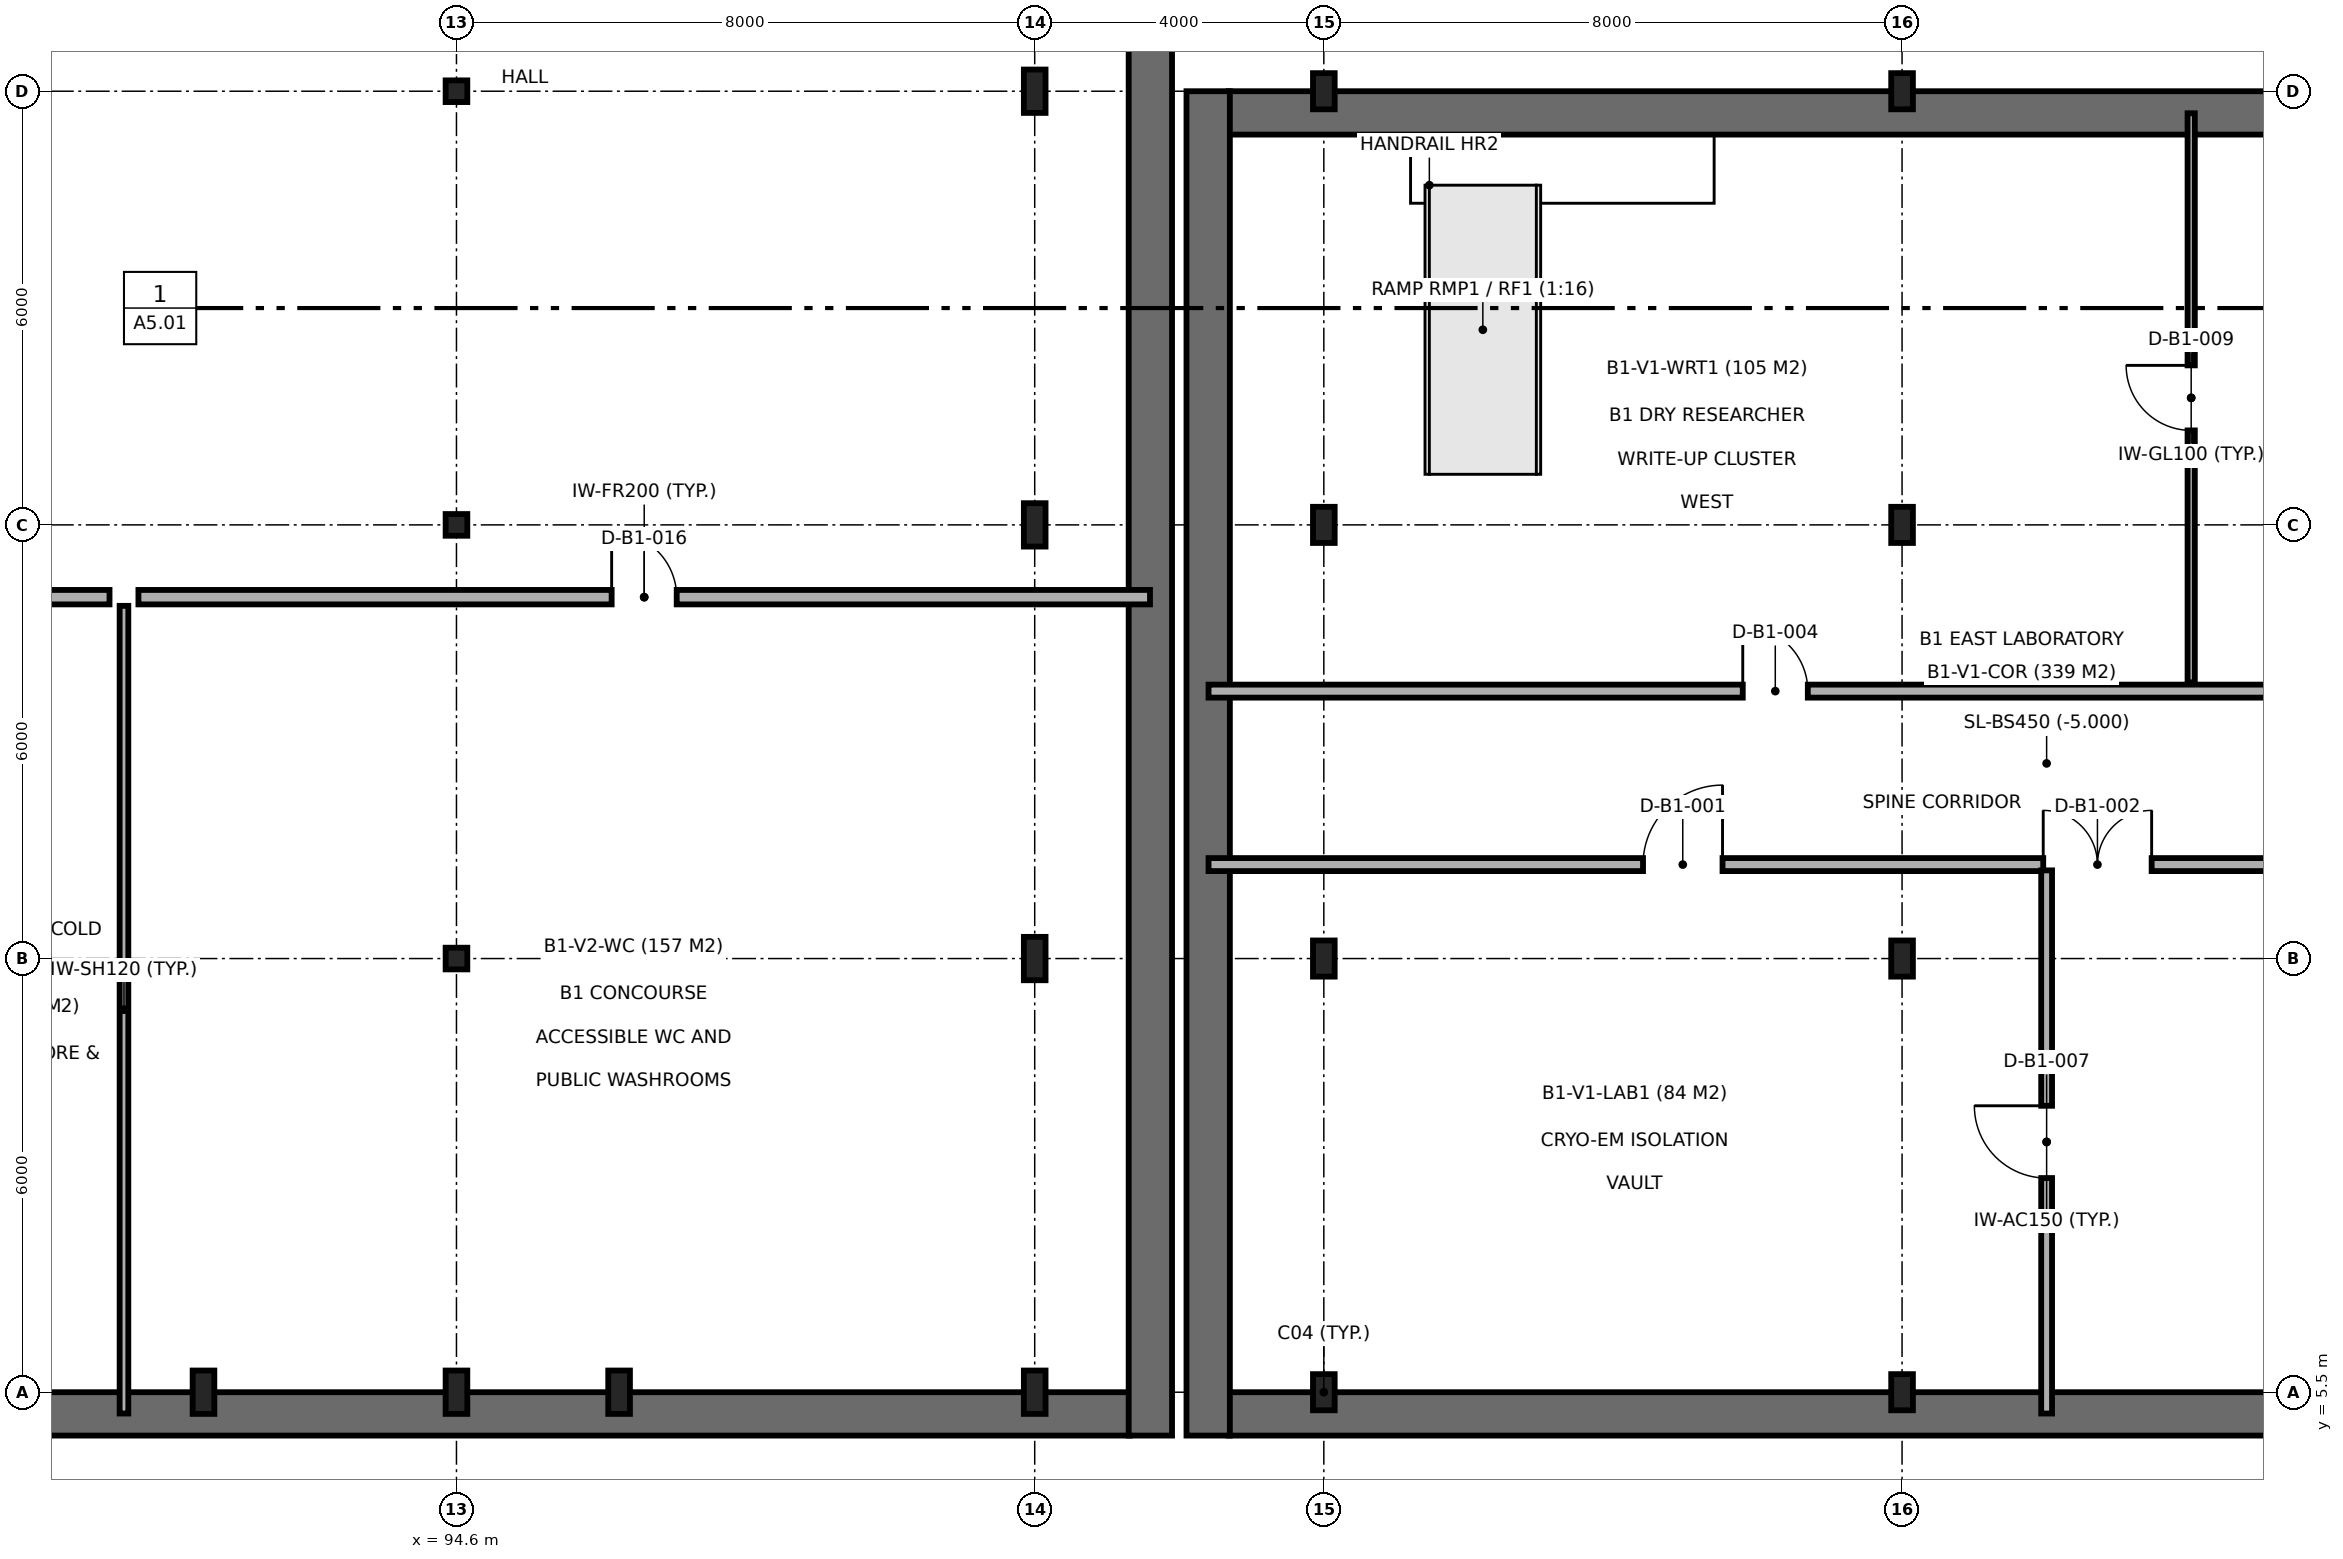
"""IFC4 building model, lengths in metres.
Left out: names, types, materials, properties, quantities, classifications, styles, units other than length and angle.
Written with IfcOpenShell. Run it as: python <this file> out.ifc"""

import sys

from ifc_helpers import new_model, si_unit, direction, frame, frame_2d, origin, origin_2d, place, context, subcontext, project, spatial, rectangle, hollow_rectangle, i_section, extrude, element, fill, save


model = new_model("IFC4")
c1 = context("Model", 3, precision=1e-05, world=origin(), true_north=direction((0.0, 1.0)))
c2 = subcontext(c1, "Body", "Model", "MODEL_VIEW")
j1 = project(units=[si_unit("LENGTHUNIT", "METRE"), si_unit("PLANEANGLEUNIT", "RADIAN")], contexts=[c1])
p1 = place(None, origin())
s1 = spatial("IfcSite", under=j1, at=p1, CompositionType="ELEMENT")
p2 = place(p1, origin())
s2 = spatial("IfcBuilding", under=s1, at=p2, CompositionType="ELEMENT")
p3 = place(p2, frame((0.0, 0.0, -5.0)))
s3 = spatial("IfcBuildingStorey", under=s2, at=p3, CompositionType="ELEMENT", Elevation=-5.0)
for number, where, z_axis, x_axis in (
    (1, (91.1, 5.5, 0.0), (0.0, 0.0, 1.0), (1.0, 0.0, 0.0)),
    (2, (94.6, 5.5, 0.0), (0.0, 0.0, 1.0), (1.0, 0.0, 0.0)),
):
    element("IfcColumn", number, at=place(p3, frame(where, z_axis=z_axis, x_axis=x_axis)), inside=s3, PredefinedType="COLUMN", context=c2, shape_type="SweptSolid", body=[
        extrude(i_section(OverallWidth=0.3, OverallDepth=0.6, WebThickness=0.015, FlangeThickness=0.03, FilletRadius=0.027, at=origin_2d()), origin(), (0.0, 0.0, 1.0), 5.0),
    ])
for number, where, z_axis, x_axis in (
    (3, (94.6, 11.5, 0.0), (0.0, 0.0, 1.0), (1.0, 0.0, 0.0)),
    (4, (94.6, 17.5, 0.0), (0.0, 0.0, 1.0), (1.0, 0.0, 0.0)),
    (5, (94.6, 23.5, 0.0), (0.0, 0.0, 1.0), (1.0, 0.0, 0.0)),
):
    element("IfcColumn", number, at=place(p3, frame(where, z_axis=z_axis, x_axis=x_axis)), inside=s3, PredefinedType="COLUMN", context=c2, shape_type="SweptSolid", body=[
        extrude(hollow_rectangle(XDim=0.3, YDim=0.3, WallThickness=0.012, InnerFilletRadius=0.019, OuterFilletRadius=0.031, at=origin_2d()), origin(), (0.0, 0.0, 1.0), 5.0),
    ])
for number, where, z_axis, x_axis in (
    (6, (96.85, 5.5, 0.0), (0.0, 0.0, 1.0), (1.0, 0.0, 0.0)),
    (7, (102.6, 5.5, 0.0), (0.0, 0.0, 1.0), (1.0, 0.0, 0.0)),
    (8, (102.6, 11.5, 0.0), (0.0, 0.0, 1.0), (1.0, 0.0, 0.0)),
    (9, (102.6, 17.5, 0.0), (0.0, 0.0, 1.0), (1.0, 0.0, 0.0)),
    (10, (102.6, 23.5, 0.0), (0.0, 0.0, 1.0), (1.0, 0.0, 0.0)),
):
    element("IfcColumn", number, at=place(p3, frame(where, z_axis=z_axis, x_axis=x_axis)), inside=s3, PredefinedType="COLUMN", context=c2, shape_type="SweptSolid", body=[
        extrude(i_section(OverallWidth=0.3, OverallDepth=0.6, WebThickness=0.015, FlangeThickness=0.03, FilletRadius=0.027, at=origin_2d()), origin(), (0.0, 0.0, 1.0), 5.0),
    ])
for number, where, z_axis, x_axis in (
    (11, (106.6, 5.5, 0.0), (0.0, 0.0, 1.0), (1.0, 0.0, 0.0)),
    (12, (106.6, 11.5, 0.0), (0.0, 0.0, 1.0), (1.0, 0.0, 0.0)),
    (13, (106.6, 17.5, 0.0), (0.0, 0.0, 1.0), (1.0, 0.0, 0.0)),
    (14, (106.6, 23.5, 0.0), (0.0, 0.0, 1.0), (1.0, 0.0, 0.0)),
    (15, (114.6, 5.5, 0.0), (0.0, 0.0, 1.0), (1.0, 0.0, 0.0)),
    (16, (114.6, 11.5, 0.0), (0.0, 0.0, 1.0), (1.0, 0.0, 0.0)),
    (17, (114.6, 17.5, 0.0), (0.0, 0.0, 1.0), (1.0, 0.0, 0.0)),
    (18, (114.6, 23.5, 0.0), (0.0, 0.0, 1.0), (1.0, 0.0, 0.0)),
):
    element("IfcColumn", number, at=place(p3, frame(where, z_axis=z_axis, x_axis=x_axis)), inside=s3, PredefinedType="COLUMN", context=c2, shape_type="SweptSolid", body=[
        extrude(i_section(OverallWidth=0.3, OverallDepth=0.5, WebThickness=0.014, FlangeThickness=0.028, FilletRadius=0.027, at=origin_2d()), origin(), (0.0, 0.0, 1.0), 5.0),
    ])
p4 = place(p3, frame((105.282, 5.2, 0.0), z_axis=(0.0, 0.0, 1.0), x_axis=(1.0, 0.0, 0.0)))
e19 = element("IfcWall", 19, at=p4, inside=s3, PredefinedType="SHEAR", context=c2, shape_type="SweptSolid", body=[
    extrude(rectangle(XDim=59.118, YDim=0.6, at=frame_2d((29.559, 0.0))), origin(), (0.0, 0.0, 1.0), 4.7),
])
p5 = place(p3, frame((139.182, 23.2, 0.0), z_axis=(0.0, 0.0, 1.0), x_axis=(-1.0, 0.0, 0.0)))
e20 = element("IfcWall", 20, at=p5, inside=s3, PredefinedType="SHEAR", context=c2, shape_type="SweptSolid", body=[
    extrude(rectangle(XDim=33.9, YDim=0.6, at=frame_2d((16.95, 0.0))), origin(), (0.0, 0.0, 1.0), 4.7),
])
p6 = place(p3, frame((105.0, 23.5, 0.0), z_axis=(0.0, 0.0, 1.0), x_axis=(0.0, -1.0, 0.0)))
e21 = element("IfcWall", 21, at=p6, inside=s3, PredefinedType="SHEAR", context=c2, shape_type="SweptSolid", body=[
    extrude(rectangle(XDim=18.6, YDim=0.6, at=frame_2d((9.3, 0.0))), origin(), (0.0, 0.0, 1.0), 4.7),
])
p7 = place(p3, frame((55.282, 5.2, 0.0), z_axis=(0.0, 0.0, 1.0), x_axis=(1.0, 0.0, 0.0)))
e22 = element("IfcWall", 22, at=p7, inside=s3, PredefinedType="SHEAR", context=c2, shape_type="SweptSolid", body=[
    extrude(rectangle(XDim=48.636, YDim=0.6, at=frame_2d((24.318, 0.0))), origin(), (0.0, 0.0, 1.0), 4.7),
])
p8 = place(p3, frame((104.2, 4.9, 0.0), z_axis=(0.0, 0.0, 1.0), x_axis=(0.0, 1.0, 0.0)))
e23 = element("IfcWall", 23, at=p8, inside=s3, PredefinedType="SHEAR", context=c2, shape_type="SweptSolid", body=[
    extrude(rectangle(XDim=36.6, YDim=0.6, at=frame_2d((18.3, 0.0))), origin(), (0.0, 0.0, 1.0), 4.7),
])
p9 = place(p3, frame((105.005, 12.8, 0.0), z_axis=(0.0, 0.0, 1.0), x_axis=(1.0, 0.0, 0.0)))
e24 = element("IfcWall", 24, at=p9, inside=s3, PredefinedType="PARTITIONING", context=c2, shape_type="SweptSolid", body=[
    extrude(rectangle(XDim=34.495, YDim=0.18, at=frame_2d((17.248, 0.0))), origin(), (0.0, 0.0, 1.0), 4.7),
])
p10 = place(p9, frame((6.011, 0.0, 0.0)))
e25 = element("IfcOpeningElement", 25, at=p10, cuts=e24, PredefinedType="OPENING", context=c2, shape_type="SweptSolid", body=[
    extrude(rectangle(XDim=1.1, YDim=2.15, at=frame_2d((0.55, 1.075))), frame((0.0, 0.1, 0.0), z_axis=(0.0, -1.0, 0.0), x_axis=(1.0, 0.0, 0.0)), (0.0, 0.0, 1.0), 0.2),
])
p11 = place(p9, frame((11.548, 0.0, 0.0)))
e26 = element("IfcOpeningElement", 26, at=p11, cuts=e24, PredefinedType="OPENING", context=c2, shape_type="SweptSolid", body=[
    extrude(rectangle(XDim=1.5, YDim=2.2, at=frame_2d((0.75, 1.1))), frame((0.0, 0.1, 0.0), z_axis=(0.0, -1.0, 0.0), x_axis=(1.0, 0.0, 0.0)), (0.0, 0.0, 1.0), 0.2),
])
p12 = place(p9, frame((27.548, 0.0, 0.0)))
e27 = element("IfcOpeningElement", 27, at=p12, cuts=e24, PredefinedType="OPENING", context=c2, shape_type="SweptSolid", body=[
    extrude(rectangle(XDim=0.9, YDim=2.1, at=frame_2d((0.45, 1.05))), frame((0.0, 0.1, 0.0), z_axis=(0.0, -1.0, 0.0), x_axis=(1.0, 0.0, 0.0)), (0.0, 0.0, 1.0), 0.2),
])
p13 = place(p3, frame((105.005, 15.2, 0.0), z_axis=(0.0, 0.0, 1.0), x_axis=(1.0, 0.0, 0.0)))
e28 = element("IfcWall", 28, at=p13, inside=s3, PredefinedType="PARTITIONING", context=c2, shape_type="SweptSolid", body=[
    extrude(rectangle(XDim=34.495, YDim=0.18, at=frame_2d((17.248, 0.0))), origin(), (0.0, 0.0, 1.0), 4.7),
])
p14 = place(p13, frame((7.391, 0.0, 0.0)))
e29 = element("IfcOpeningElement", 29, at=p14, cuts=e28, PredefinedType="OPENING", context=c2, shape_type="SweptSolid", body=[
    extrude(rectangle(XDim=0.9, YDim=2.1, at=frame_2d((0.45, 1.05))), frame((0.0, 0.1, 0.0), z_axis=(0.0, -1.0, 0.0), x_axis=(1.0, 0.0, 0.0)), (0.0, 0.0, 1.0), 0.2),
])
p15 = place(p13, frame((18.45, 0.0, 0.0)))
e30 = element("IfcOpeningElement", 30, at=p15, cuts=e28, PredefinedType="OPENING", context=c2, shape_type="SweptSolid", body=[
    extrude(rectangle(XDim=0.95, YDim=2.1, at=frame_2d((0.475, 1.05))), frame((0.0, 0.1, 0.0), z_axis=(0.0, -1.0, 0.0), x_axis=(1.0, 0.0, 0.0)), (0.0, 0.0, 1.0), 0.2),
])
p16 = place(p13, frame((27.466, 0.0, 0.0)))
e31 = element("IfcOpeningElement", 31, at=p16, cuts=e28, PredefinedType="OPENING", context=c2, shape_type="SweptSolid", body=[
    extrude(rectangle(XDim=1.0, YDim=2.15, at=frame_2d((0.5, 1.075))), frame((0.0, 0.1, 0.0), z_axis=(0.0, -1.0, 0.0), x_axis=(1.0, 0.0, 0.0)), (0.0, 0.0, 1.0), 0.2),
])
p17 = place(p3, frame((116.6, 5.205, 0.0), z_axis=(0.0, 0.0, 1.0), x_axis=(0.0, 1.0, 0.0)))
e32 = element("IfcWall", 32, at=p17, inside=s3, PredefinedType="PARTITIONING", context=c2, shape_type="SweptSolid", body=[
    extrude(rectangle(XDim=7.515, YDim=0.15, at=frame_2d((3.757, 0.0))), origin(), (0.0, 0.0, 1.0), 4.7),
])
p18 = place(p17, frame((3.258, 0.0, 0.0)))
e33 = element("IfcOpeningElement", 33, at=p18, cuts=e32, PredefinedType="OPENING", context=c2, shape_type="SweptSolid", body=[
    extrude(rectangle(XDim=1.0, YDim=2.15, at=frame_2d((0.5, 1.075))), frame((0.0, 0.085, 0.0), z_axis=(0.0, -1.0, 0.0), x_axis=(1.0, 0.0, 0.0)), (0.0, 0.0, 1.0), 0.17),
])
p19 = place(p3, frame((118.6, 15.32, 0.0), z_axis=(0.0, 0.0, 1.0), x_axis=(0.0, 1.0, 0.0)))
e34 = element("IfcWall", 34, at=p19, inside=s3, PredefinedType="PARTITIONING", context=c2, shape_type="SweptSolid", body=[
    extrude(rectangle(XDim=7.875, YDim=0.1, at=frame_2d((3.938, 0.0))), origin(), (0.0, 0.0, 1.0), 4.7),
])
p20 = place(p19, frame((3.487, 0.0, 0.0)))
e35 = element("IfcOpeningElement", 35, at=p20, cuts=e34, PredefinedType="OPENING", context=c2, shape_type="SweptSolid", body=[
    extrude(rectangle(XDim=0.9, YDim=2.1, at=frame_2d((0.45, 1.05))), frame((0.0, 0.06, 0.0), z_axis=(0.0, -1.0, 0.0), x_axis=(1.0, 0.0, 0.0)), (0.0, 0.0, 1.0), 0.12),
])
p21 = place(p3, frame((90.0, 5.205, 0.0), z_axis=(0.0, 0.0, 1.0), x_axis=(0.0, 1.0, 0.0)))
e36 = element("IfcWall", 36, at=p21, inside=s3, PredefinedType="PARTITIONING", context=c2, shape_type="SweptSolid", body=[
    extrude(rectangle(XDim=11.175, YDim=0.12, at=frame_2d((5.587, 0.0))), origin(), (0.0, 0.0, 1.0), 4.7),
])
p22 = place(p3, frame((72.2, 16.5, 0.0), z_axis=(0.0, 0.0, 1.0), x_axis=(1.0, 0.0, 0.0)))
e37 = element("IfcWall", 37, at=p22, inside=s3, PredefinedType="SOLIDWALL", context=c2, shape_type="SweptSolid", body=[
    extrude(rectangle(XDim=17.6, YDim=0.2, at=frame_2d((8.8, 0.0))), origin(), (0.0, 0.0, 1.0), 4.7),
])
p23 = place(p22, frame((8.05, 0.0, 0.0)))
e38 = element("IfcOpeningElement", 38, at=p23, cuts=e37, PredefinedType="OPENING", context=c2, shape_type="SweptSolid", body=[
    extrude(rectangle(XDim=1.5, YDim=2.2, at=frame_2d((0.75, 1.1))), frame((0.0, 0.11, 0.0), z_axis=(0.0, -1.0, 0.0), x_axis=(1.0, 0.0, 0.0)), (0.0, 0.0, 1.0), 0.22),
])
p24 = place(p3, frame((90.2, 16.5, 0.0), z_axis=(0.0, 0.0, 1.0), x_axis=(1.0, 0.0, 0.0)))
e39 = element("IfcWall", 39, at=p24, inside=s3, PredefinedType="SOLIDWALL", context=c2, shape_type="SweptSolid", body=[
    extrude(rectangle(XDim=13.995, YDim=0.2, at=frame_2d((6.998, 0.0))), origin(), (0.0, 0.0, 1.0), 4.7),
])
p25 = place(p24, frame((6.547, 0.0, 0.0)))
e40 = element("IfcOpeningElement", 40, at=p25, cuts=e39, PredefinedType="OPENING", context=c2, shape_type="SweptSolid", body=[
    extrude(rectangle(XDim=0.9, YDim=2.1, at=frame_2d((0.45, 1.05))), frame((0.0, 0.11, 0.0), z_axis=(0.0, -1.0, 0.0), x_axis=(1.0, 0.0, 0.0)), (0.0, 0.0, 1.0), 0.22),
])
p26 = place(p10, origin())
e41 = element("IfcDoor", 41, at=p26, inside=s3, OperationType="SINGLE_SWING_RIGHT", PredefinedType="DOOR", context=c2, shape_type="SweptSolid", body=[
    extrude(rectangle(XDim=1.1, YDim=2.15, at=frame_2d((0.55, 1.075))), frame((0.0, 0.025, 0.0), z_axis=(0.0, -1.0, 0.0), x_axis=(1.0, 0.0, 0.0)), (0.0, 0.0, 1.0), 0.05),
])
fill(e25, e41)
p27 = place(p11, origin())
e42 = element("IfcDoor", 42, at=p27, inside=s3, OperationType="DOUBLE_DOOR_SINGLE_SWING", PredefinedType="DOOR", context=c2, shape_type="SweptSolid", body=[
    extrude(rectangle(XDim=1.5, YDim=2.2, at=frame_2d((0.75, 1.1))), frame((0.0, 0.025, 0.0), z_axis=(0.0, -1.0, 0.0), x_axis=(1.0, 0.0, 0.0)), (0.0, 0.0, 1.0), 0.05),
])
fill(e26, e42)
p28 = place(p14, origin())
e43 = element("IfcDoor", 43, at=p28, inside=s3, OperationType="SINGLE_SWING_LEFT", PredefinedType="DOOR", context=c2, shape_type="SweptSolid", body=[
    extrude(rectangle(XDim=0.9, YDim=2.1, at=frame_2d((0.45, 1.05))), frame((0.0, 0.025, 0.0), z_axis=(0.0, -1.0, 0.0), x_axis=(1.0, 0.0, 0.0)), (0.0, 0.0, 1.0), 0.05),
])
fill(e29, e43)
p29 = place(p18, origin())
e44 = element("IfcDoor", 44, at=p29, inside=s3, OperationType="SINGLE_SWING_RIGHT", PredefinedType="DOOR", context=c2, shape_type="SweptSolid", body=[
    extrude(rectangle(XDim=1.0, YDim=2.15, at=frame_2d((0.5, 1.075))), frame((0.0, 0.025, 0.0), z_axis=(0.0, -1.0, 0.0), x_axis=(1.0, 0.0, 0.0)), (0.0, 0.0, 1.0), 0.05),
])
fill(e33, e44)
p30 = place(p20, origin())
e45 = element("IfcDoor", 45, at=p30, inside=s3, OperationType="SINGLE_SWING_RIGHT", PredefinedType="DOOR", context=c2, shape_type="SweptSolid", body=[
    extrude(rectangle(XDim=0.9, YDim=2.1, at=frame_2d((0.45, 1.05))), frame((0.0, 0.025, 0.0), z_axis=(0.0, -1.0, 0.0), x_axis=(1.0, 0.0, 0.0)), (0.0, 0.0, 1.0), 0.05),
])
fill(e35, e45)
p31 = place(p25, origin())
e46 = element("IfcDoor", 46, at=p31, inside=s3, OperationType="SINGLE_SWING_LEFT", PredefinedType="DOOR", context=c2, shape_type="SweptSolid", body=[
    extrude(rectangle(XDim=0.9, YDim=2.1, at=frame_2d((0.45, 1.05))), frame((0.0, 0.025, 0.0), z_axis=(0.0, -1.0, 0.0), x_axis=(1.0, 0.0, 0.0)), (0.0, 0.0, 1.0), 0.05),
])
fill(e40, e46)
save(model, sys.argv[1])
